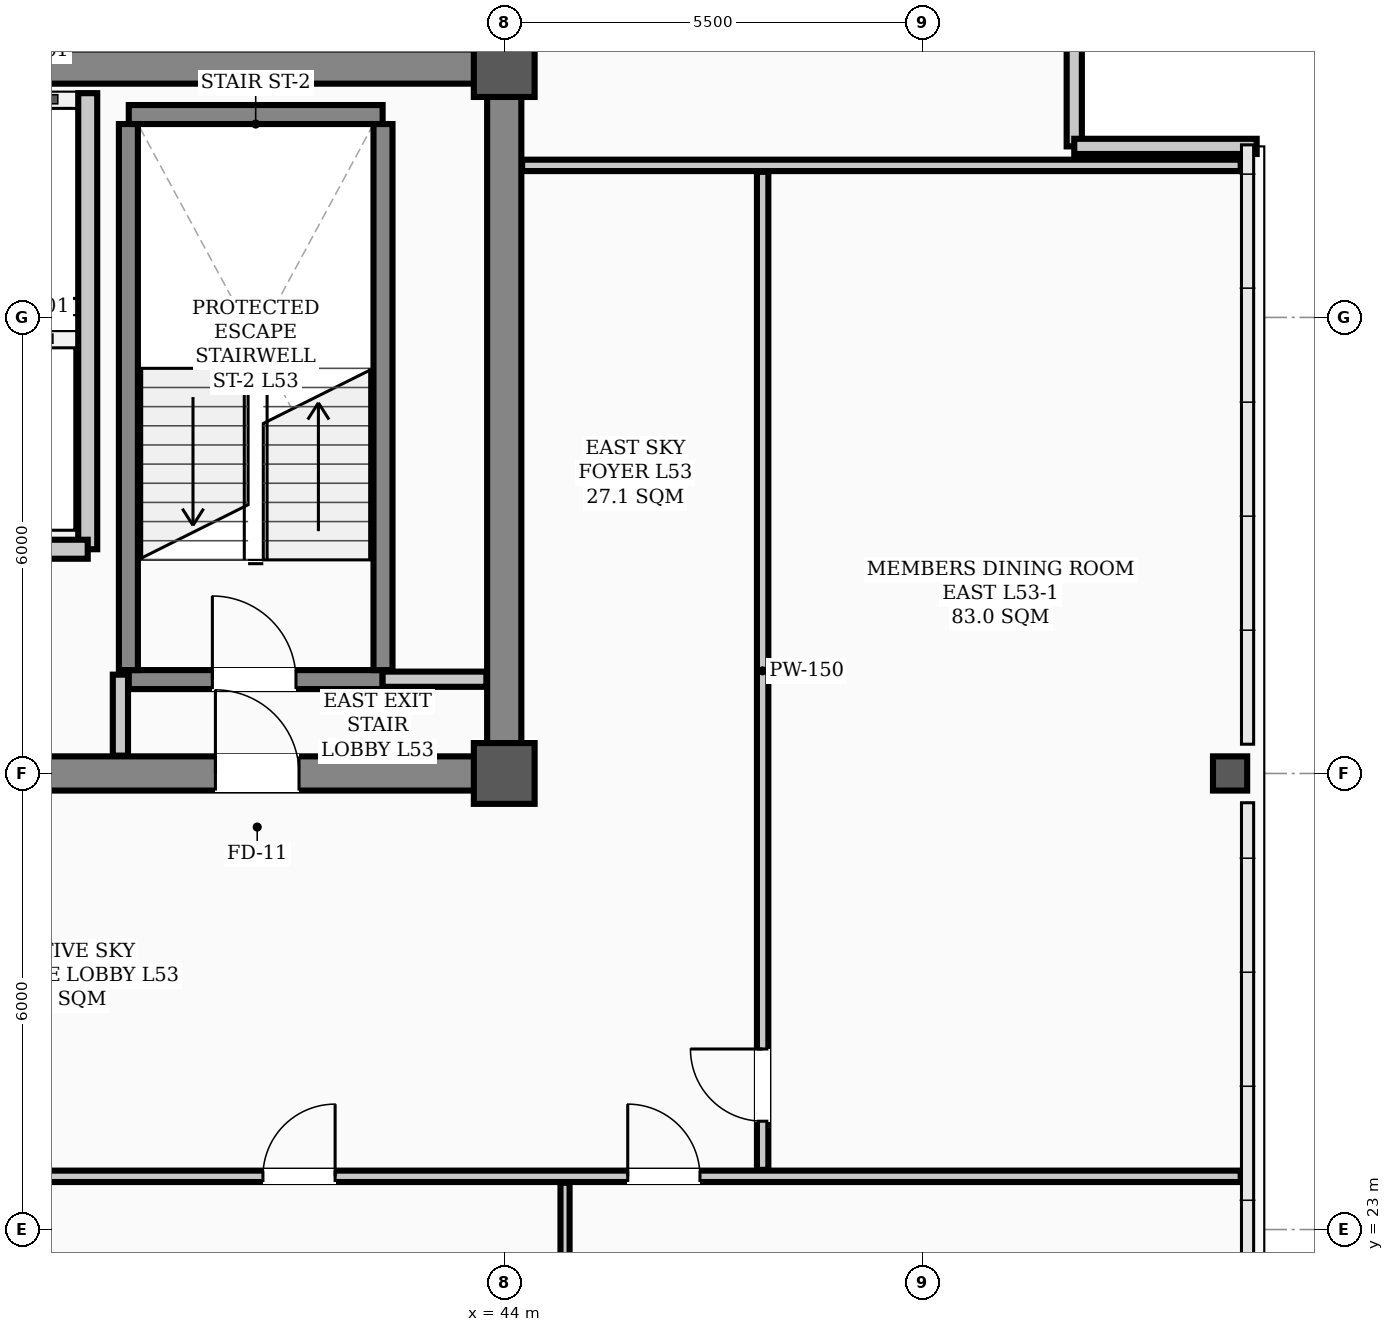
"""IFC4 building model, lengths in metres.
Left out: names, types, materials, properties, quantities, classifications, styles, units other than length and angle.
Written with IfcOpenShell. Run it as: python <this file> out.ifc"""

import sys

from ifc_helpers import new_model, si_unit, direction, frame, frame_2d, origin, origin_2d, place, context, subcontext, project, spatial, rectangle, hollow_rectangle, extrude, element, fill, save


model = new_model("IFC4")
c1 = context("Model", 3, precision=1e-05, world=origin(), true_north=direction((0.0, 1.0)))
c2 = subcontext(c1, "Body", "Model", "MODEL_VIEW")
j1 = project(units=[si_unit("LENGTHUNIT", "METRE"), si_unit("PLANEANGLEUNIT", "RADIAN")], contexts=[c1])
p1 = place(None, origin())
s1 = spatial("IfcSite", under=j1, at=p1, CompositionType="ELEMENT")
p2 = place(p1, origin())
s2 = spatial("IfcBuilding", under=s1, at=p2, CompositionType="ELEMENT")
p3 = place(p2, frame((0.0, 0.0, 215.0)))
s3 = spatial("IfcBuildingStorey", under=s2, at=p3, CompositionType="ELEMENT", Elevation=215.0)
for number, where, z_axis, x_axis in (
    (1, (44.0, 29.0, 0.0), (0.0, 0.0, 1.0), (1.0, 0.0, 0.0)),
    (2, (44.0, 38.3, 0.0), (0.0, 0.0, 1.0), (1.0, 0.0, 0.0)),
):
    element("IfcColumn", number, at=place(p3, frame(where, z_axis=z_axis, x_axis=x_axis)), inside=s3, PredefinedType="COLUMN", context=c2, shape_type="SweptSolid", body=[
        extrude(hollow_rectangle(XDim=0.8, YDim=0.8, WallThickness=0.032, InnerFilletRadius=0.016, OuterFilletRadius=0.048, at=origin_2d()), origin(), (0.0, 0.0, 1.0), 3.9),
    ])
p4 = place(p3, frame((53.55, 29.0, 0.0), z_axis=(0.0, 0.0, 1.0), x_axis=(1.0, 0.0, 0.0)))
e3 = element("IfcColumn", 3, at=p4, inside=s3, PredefinedType="COLUMN", context=c2, shape_type="SweptSolid", body=[
    extrude(hollow_rectangle(XDim=0.45, YDim=0.45, WallThickness=0.022, InnerFilletRadius=0.022, OuterFilletRadius=0.044, at=origin_2d()), origin(), (0.0, 0.0, 1.0), 3.9),
])
for number, where, z_axis, x_axis in (
    (4, (51.5, 39.65, 0.0), (0.0, 0.0, 1.0), (0.0, -1.0, 0.0)),
    (5, (51.5, 37.25, 0.0), (0.0, 0.0, 1.0), (1.0, 0.0, 0.0)),
):
    element("IfcWall", number, at=place(p3, frame(where, z_axis=z_axis, x_axis=x_axis)), inside=s3, PredefinedType="PARAPET", context=c2, shape_type="SweptSolid", body=[
        extrude(rectangle(XDim=2.4, YDim=0.2, at=frame_2d((1.2, 0.0))), origin(), (0.0, 0.0, 1.0), 1.2),
    ])
p5 = place(p3, frame((13.5, 29.0, 0.0), z_axis=(0.0, 0.0, 1.0), x_axis=(1.0, 0.0, 0.0)))
e6 = element("IfcWall", 6, at=p5, inside=s3, PredefinedType="SHEAR", context=c2, shape_type="SweptSolid", body=[
    extrude(rectangle(XDim=30.5, YDim=0.45, at=frame_2d((15.25, 0.0))), origin(), (0.0, 0.0, 1.0), 3.72),
])
p6 = place(p5, frame((1.75, 0.0, 0.0)))
e7 = element("IfcOpeningElement", 7, at=p6, cuts=e6, PredefinedType="OPENING", context=c2, shape_type="SweptSolid", body=[
    extrude(rectangle(XDim=1.1, YDim=2.08, at=frame_2d((0.55, 1.04))), frame((0.0, 0.235, 0.0), z_axis=(0.0, -1.0, 0.0), x_axis=(1.0, 0.0, 0.0)), (0.0, 0.0, 1.0), 0.47),
])
p7 = place(p5, frame((26.7, 0.0, 0.0)))
e8 = element("IfcOpeningElement", 8, at=p7, cuts=e6, PredefinedType="OPENING", context=c2, shape_type="SweptSolid", body=[
    extrude(rectangle(XDim=1.1, YDim=2.08, at=frame_2d((0.55, 1.04))), frame((0.0, 0.235, 0.0), z_axis=(0.0, -1.0, 0.0), x_axis=(1.0, 0.0, 0.0)), (0.0, 0.0, 1.0), 0.47),
])
p8 = place(p5, frame((6.8, 0.0, 0.0)))
e9 = element("IfcOpeningElement", 9, at=p8, cuts=e6, PredefinedType="OPENING", context=c2, shape_type="SweptSolid", body=[
    extrude(rectangle(XDim=1.1, YDim=2.08, at=frame_2d((0.55, 1.04))), frame((0.0, 0.235, 0.0), z_axis=(0.0, -1.0, 0.0), x_axis=(1.0, 0.0, 0.0)), (0.0, 0.0, 1.0), 0.47),
])
p9 = place(p5, frame((13.2, 0.0, 0.0)))
e10 = element("IfcOpeningElement", 10, at=p9, cuts=e6, PredefinedType="OPENING", context=c2, shape_type="SweptSolid", body=[
    extrude(rectangle(XDim=1.6, YDim=2.08, at=frame_2d((0.8, 1.04))), frame((0.0, 0.235, 0.0), z_axis=(0.0, -1.0, 0.0), x_axis=(1.0, 0.0, 0.0)), (0.0, 0.0, 1.0), 0.47),
])
p10 = place(p5, frame((19.5, 0.0, 0.0)))
e11 = element("IfcOpeningElement", 11, at=p10, cuts=e6, PredefinedType="OPENING", context=c2, shape_type="SweptSolid", body=[
    extrude(rectangle(XDim=0.9, YDim=2.08, at=frame_2d((0.45, 1.04))), frame((0.0, 0.235, 0.0), z_axis=(0.0, -1.0, 0.0), x_axis=(1.0, 0.0, 0.0)), (0.0, 0.0, 1.0), 0.47),
])
p11 = place(p5, frame((21.55, 0.0, 0.0)))
e12 = element("IfcOpeningElement", 12, at=p11, cuts=e6, PredefinedType="OPENING", context=c2, shape_type="SweptSolid", body=[
    extrude(rectangle(XDim=0.9, YDim=2.08, at=frame_2d((0.45, 1.04))), frame((0.0, 0.235, 0.0), z_axis=(0.0, -1.0, 0.0), x_axis=(1.0, 0.0, 0.0)), (0.0, 0.0, 1.0), 0.47),
])
p12 = place(p3, frame((13.5, 38.3, 0.0), z_axis=(0.0, 0.0, 1.0), x_axis=(1.0, 0.0, 0.0)))
e13 = element("IfcWall", 13, at=p12, inside=s3, PredefinedType="SHEAR", context=c2, shape_type="SweptSolid", body=[
    extrude(rectangle(XDim=30.5, YDim=0.45, at=frame_2d((15.25, 0.0))), origin(), (0.0, 0.0, 1.0), 3.72),
])
p13 = place(p3, frame((44.0, 29.35, 0.0), z_axis=(0.0, 0.0, 1.0), x_axis=(0.0, 1.0, 0.0)))
e14 = element("IfcWall", 14, at=p13, inside=s3, PredefinedType="SHEAR", context=c2, shape_type="SweptSolid", body=[
    extrude(rectangle(XDim=8.6, YDim=0.45, at=frame_2d((4.3, 0.0))), origin(), (0.0, 0.0, 1.0), 3.72),
])
p14 = place(p3, frame((39.06, 30.235, 0.0), z_axis=(0.0, 0.0, 1.0), x_axis=(1.0, 0.0, 0.0)))
e15 = element("IfcWall", 15, at=p14, inside=s3, PredefinedType="STANDARD", context=c2, shape_type="SweptSolid", body=[
    extrude(rectangle(XDim=3.34, YDim=0.25, at=frame_2d((1.67, 0.0))), origin(), (0.0, 0.0, 1.0), 3.72),
])
p15 = place(p14, frame((1.1, 0.0, 0.0)))
e16 = element("IfcOpeningElement", 16, at=p15, cuts=e15, PredefinedType="OPENING", context=c2, shape_type="SweptSolid", body=[
    extrude(rectangle(XDim=1.1, YDim=2.08, at=frame_2d((0.55, 1.04))), frame((0.0, 0.135, 0.0), z_axis=(0.0, -1.0, 0.0), x_axis=(1.0, 0.0, 0.0)), (0.0, 0.0, 1.0), 0.27),
])
p16 = place(p3, frame((39.06, 37.669, 0.0), z_axis=(0.0, 0.0, 1.0), x_axis=(1.0, 0.0, 0.0)))
e17 = element("IfcWall", 17, at=p16, inside=s3, PredefinedType="STANDARD", context=c2, shape_type="SweptSolid", body=[
    extrude(rectangle(XDim=3.34, YDim=0.25, at=frame_2d((1.67, 0.0))), origin(), (0.0, 0.0, 1.0), 3.72),
])
for number, where, z_axis, x_axis in (
    (18, (39.055, 30.36, 0.0), (0.0, 0.0, 1.0), (0.0, 1.0, 0.0)),
    (19, (42.405, 30.36, 0.0), (0.0, 0.0, 1.0), (0.0, 1.0, 0.0)),
):
    element("IfcWall", number, at=place(p3, frame(where, z_axis=z_axis, x_axis=x_axis)), inside=s3, PredefinedType="STANDARD", context=c2, shape_type="SweptSolid", body=[
        extrude(rectangle(XDim=7.184, YDim=0.25, at=frame_2d((3.592, 0.0))), origin(), (0.0, 0.0, 1.0), 3.72),
    ])
p17 = place(p3, frame((38.52, 31.95, 0.0), z_axis=(0.0, 0.0, 1.0), x_axis=(0.0, 1.0, 0.0)))
e20 = element("IfcWall", 20, at=p17, inside=s3, PredefinedType="STANDARD", context=c2, shape_type="SweptSolid", body=[
    extrude(rectangle(XDim=6.0, YDim=0.25, at=frame_2d((3.0, 0.0))), origin(), (0.0, 0.0, 1.0), 3.48),
])
p18 = place(p3, frame((36.62, 31.95, 0.0), z_axis=(0.0, 0.0, 1.0), x_axis=(1.0, 0.0, 0.0)))
e21 = element("IfcWall", 21, at=p18, inside=s3, PredefinedType="STANDARD", context=c2, shape_type="SweptSolid", body=[
    extrude(rectangle(XDim=1.9, YDim=0.25, at=frame_2d((0.95, 0.0))), origin(), (0.0, 0.0, 1.0), 3.48),
])
p19 = place(p3, frame((42.4, 30.24, 0.0), z_axis=(0.0, 0.0, 1.0), x_axis=(1.0, 0.0, 0.0)))
e22 = element("IfcWall", 22, at=p19, inside=s3, PredefinedType="STANDARD", context=c2, shape_type="SweptSolid", body=[
    extrude(rectangle(XDim=1.365, YDim=0.2, at=frame_2d((0.683, 0.0))), origin(), (0.0, 0.0, 1.0), 3.2),
])
p20 = place(p3, frame((10.31, 23.7, 0.0), z_axis=(0.0, 0.0, 1.0), x_axis=(1.0, 0.0, 0.0)))
e23 = element("IfcWall", 23, at=p20, inside=s3, PredefinedType="PARTITIONING", context=c2, shape_type="SweptSolid", body=[
    extrude(rectangle(XDim=43.38, YDim=0.15, at=frame_2d((21.69, 0.0))), origin(), (0.0, 0.0, 1.0), 3.2),
])
p21 = place(p20, frame((0.57, 0.0, 0.0)))
e24 = element("IfcOpeningElement", 24, at=p21, cuts=e23, PredefinedType="OPENING", context=c2, shape_type="SweptSolid", body=[
    extrude(rectangle(XDim=0.95, YDim=2.08, at=frame_2d((0.475, 1.04))), frame((0.0, 0.085, 0.0), z_axis=(0.0, -1.0, 0.0), x_axis=(1.0, 0.0, 0.0)), (0.0, 0.0, 1.0), 0.17),
])
p22 = place(p20, frame((7.115, 0.0, 0.0)))
e25 = element("IfcOpeningElement", 25, at=p22, cuts=e23, PredefinedType="OPENING", context=c2, shape_type="SweptSolid", body=[
    extrude(rectangle(XDim=0.95, YDim=2.08, at=frame_2d((0.475, 1.04))), frame((0.0, 0.085, 0.0), z_axis=(0.0, -1.0, 0.0), x_axis=(1.0, 0.0, 0.0)), (0.0, 0.0, 1.0), 0.17),
])
p23 = place(p20, frame((15.115, 0.0, 0.0)))
e26 = element("IfcOpeningElement", 26, at=p23, cuts=e23, PredefinedType="OPENING", context=c2, shape_type="SweptSolid", body=[
    extrude(rectangle(XDim=0.95, YDim=2.08, at=frame_2d((0.475, 1.04))), frame((0.0, 0.085, 0.0), z_axis=(0.0, -1.0, 0.0), x_axis=(1.0, 0.0, 0.0)), (0.0, 0.0, 1.0), 0.17),
])
p24 = place(p20, frame((23.215, 0.0, 0.0)))
e27 = element("IfcOpeningElement", 27, at=p24, cuts=e23, PredefinedType="OPENING", context=c2, shape_type="SweptSolid", body=[
    extrude(rectangle(XDim=0.95, YDim=2.08, at=frame_2d((0.475, 1.04))), frame((0.0, 0.085, 0.0), z_axis=(0.0, -1.0, 0.0), x_axis=(1.0, 0.0, 0.0)), (0.0, 0.0, 1.0), 0.17),
])
p25 = place(p20, frame((30.515, 0.0, 0.0)))
e28 = element("IfcOpeningElement", 28, at=p25, cuts=e23, PredefinedType="OPENING", context=c2, shape_type="SweptSolid", body=[
    extrude(rectangle(XDim=0.95, YDim=2.08, at=frame_2d((0.475, 1.04))), frame((0.0, 0.085, 0.0), z_axis=(0.0, -1.0, 0.0), x_axis=(1.0, 0.0, 0.0)), (0.0, 0.0, 1.0), 0.17),
])
p26 = place(p20, frame((35.315, 0.0, 0.0)))
e29 = element("IfcOpeningElement", 29, at=p26, cuts=e23, PredefinedType="OPENING", context=c2, shape_type="SweptSolid", body=[
    extrude(rectangle(XDim=0.95, YDim=2.08, at=frame_2d((0.475, 1.04))), frame((0.0, 0.085, 0.0), z_axis=(0.0, -1.0, 0.0), x_axis=(1.0, 0.0, 0.0)), (0.0, 0.0, 1.0), 0.17),
])
p27 = place(p3, frame((44.235, 37.0, 0.0), z_axis=(0.0, 0.0, 1.0), x_axis=(1.0, 0.0, 0.0)))
e30 = element("IfcWall", 30, at=p27, inside=s3, PredefinedType="PARTITIONING", context=c2, shape_type="SweptSolid", body=[
    extrude(rectangle(XDim=9.455, YDim=0.15, at=frame_2d((4.728, 0.0))), origin(), (0.0, 0.0, 1.0), 3.2),
])
p28 = place(p3, frame((38.95, 29.235, 0.0), z_axis=(0.0, 0.0, 1.0), x_axis=(0.0, 1.0, 0.0)))
e31 = element("IfcWall", 31, at=p28, inside=s3, PredefinedType="STANDARD", context=c2, shape_type="SweptSolid", body=[
    extrude(rectangle(XDim=1.065, YDim=0.2, at=frame_2d((0.532, 0.0))), origin(), (0.0, 0.0, 1.0), 3.35),
])
p29 = place(p3, frame((47.4, 23.785, 0.0), z_axis=(0.0, 0.0, 1.0), x_axis=(0.0, 1.0, 0.0)))
e32 = element("IfcWall", 32, at=p29, inside=s3, PredefinedType="PARTITIONING", context=c2, shape_type="SweptSolid", body=[
    extrude(rectangle(XDim=13.13, YDim=0.15, at=frame_2d((6.565, 0.0))), origin(), (0.0, 0.0, 1.0), 3.1),
])
p30 = place(p29, frame((0.64, 0.0, 0.0)))
e33 = element("IfcOpeningElement", 33, at=p30, cuts=e32, PredefinedType="OPENING", context=c2, shape_type="SweptSolid", body=[
    extrude(rectangle(XDim=0.95, YDim=2.08, at=frame_2d((0.475, 1.04))), frame((0.0, 0.085, 0.0), z_axis=(0.0, -1.0, 0.0), x_axis=(1.0, 0.0, 0.0)), (0.0, 0.0, 1.0), 0.17),
])
p31 = place(p3, frame((44.8, 11.56, 0.0), z_axis=(0.0, 0.0, 1.0), x_axis=(0.0, 1.0, 0.0)))
e34 = element("IfcWall", 34, at=p31, inside=s3, PredefinedType="PARTITIONING", context=c2, shape_type="SweptSolid", body=[
    extrude(rectangle(XDim=12.055, YDim=0.12, at=frame_2d((6.027, 0.0))), origin(), (0.0, 0.0, 1.0), 3.1),
])
p32 = place(p15, origin())
e35 = element("IfcDoor", 35, at=p32, inside=s3, OperationType="SINGLE_SWING_LEFT", PredefinedType="DOOR", context=c2, shape_type="SweptSolid", body=[
    extrude(rectangle(XDim=1.1, YDim=2.08, at=frame_2d((0.55, 1.04))), frame((0.0, 0.025, 0.0), z_axis=(0.0, -1.0, 0.0), x_axis=(1.0, 0.0, 0.0)), (0.0, 0.0, 1.0), 0.05),
])
fill(e16, e35)
p33 = place(p7, origin())
e36 = element("IfcDoor", 36, at=p33, inside=s3, OperationType="SINGLE_SWING_LEFT", PredefinedType="DOOR", context=c2, shape_type="SweptSolid", body=[
    extrude(rectangle(XDim=1.1, YDim=2.08, at=frame_2d((0.55, 1.04))), frame((0.0, 0.025, 0.0), z_axis=(0.0, -1.0, 0.0), x_axis=(1.0, 0.0, 0.0)), (0.0, 0.0, 1.0), 0.05),
])
fill(e8, e36)
p34 = place(p25, origin())
e37 = element("IfcDoor", 37, at=p34, inside=s3, OperationType="SINGLE_SWING_RIGHT", PredefinedType="DOOR", context=c2, shape_type="SweptSolid", body=[
    extrude(rectangle(XDim=0.95, YDim=2.08, at=frame_2d((0.475, 1.04))), frame((0.0, 0.025, 0.0), z_axis=(0.0, -1.0, 0.0), x_axis=(1.0, 0.0, 0.0)), (0.0, 0.0, 1.0), 0.05),
])
fill(e28, e37)
p35 = place(p26, origin())
e38 = element("IfcDoor", 38, at=p35, inside=s3, OperationType="SINGLE_SWING_LEFT", PredefinedType="DOOR", context=c2, shape_type="SweptSolid", body=[
    extrude(rectangle(XDim=0.95, YDim=2.08, at=frame_2d((0.475, 1.04))), frame((0.0, 0.025, 0.0), z_axis=(0.0, -1.0, 0.0), x_axis=(1.0, 0.0, 0.0)), (0.0, 0.0, 1.0), 0.05),
])
fill(e29, e38)
p36 = place(p30, origin())
e39 = element("IfcDoor", 39, at=p36, inside=s3, OperationType="SINGLE_SWING_RIGHT", PredefinedType="DOOR", context=c2, shape_type="SweptSolid", body=[
    extrude(rectangle(XDim=0.95, YDim=2.08, at=frame_2d((0.475, 1.04))), frame((0.0, 0.025, 0.0), z_axis=(0.0, -1.0, 0.0), x_axis=(1.0, 0.0, 0.0)), (0.0, 0.0, 1.0), 0.05),
])
fill(e33, e39)
save(model, sys.argv[1])
